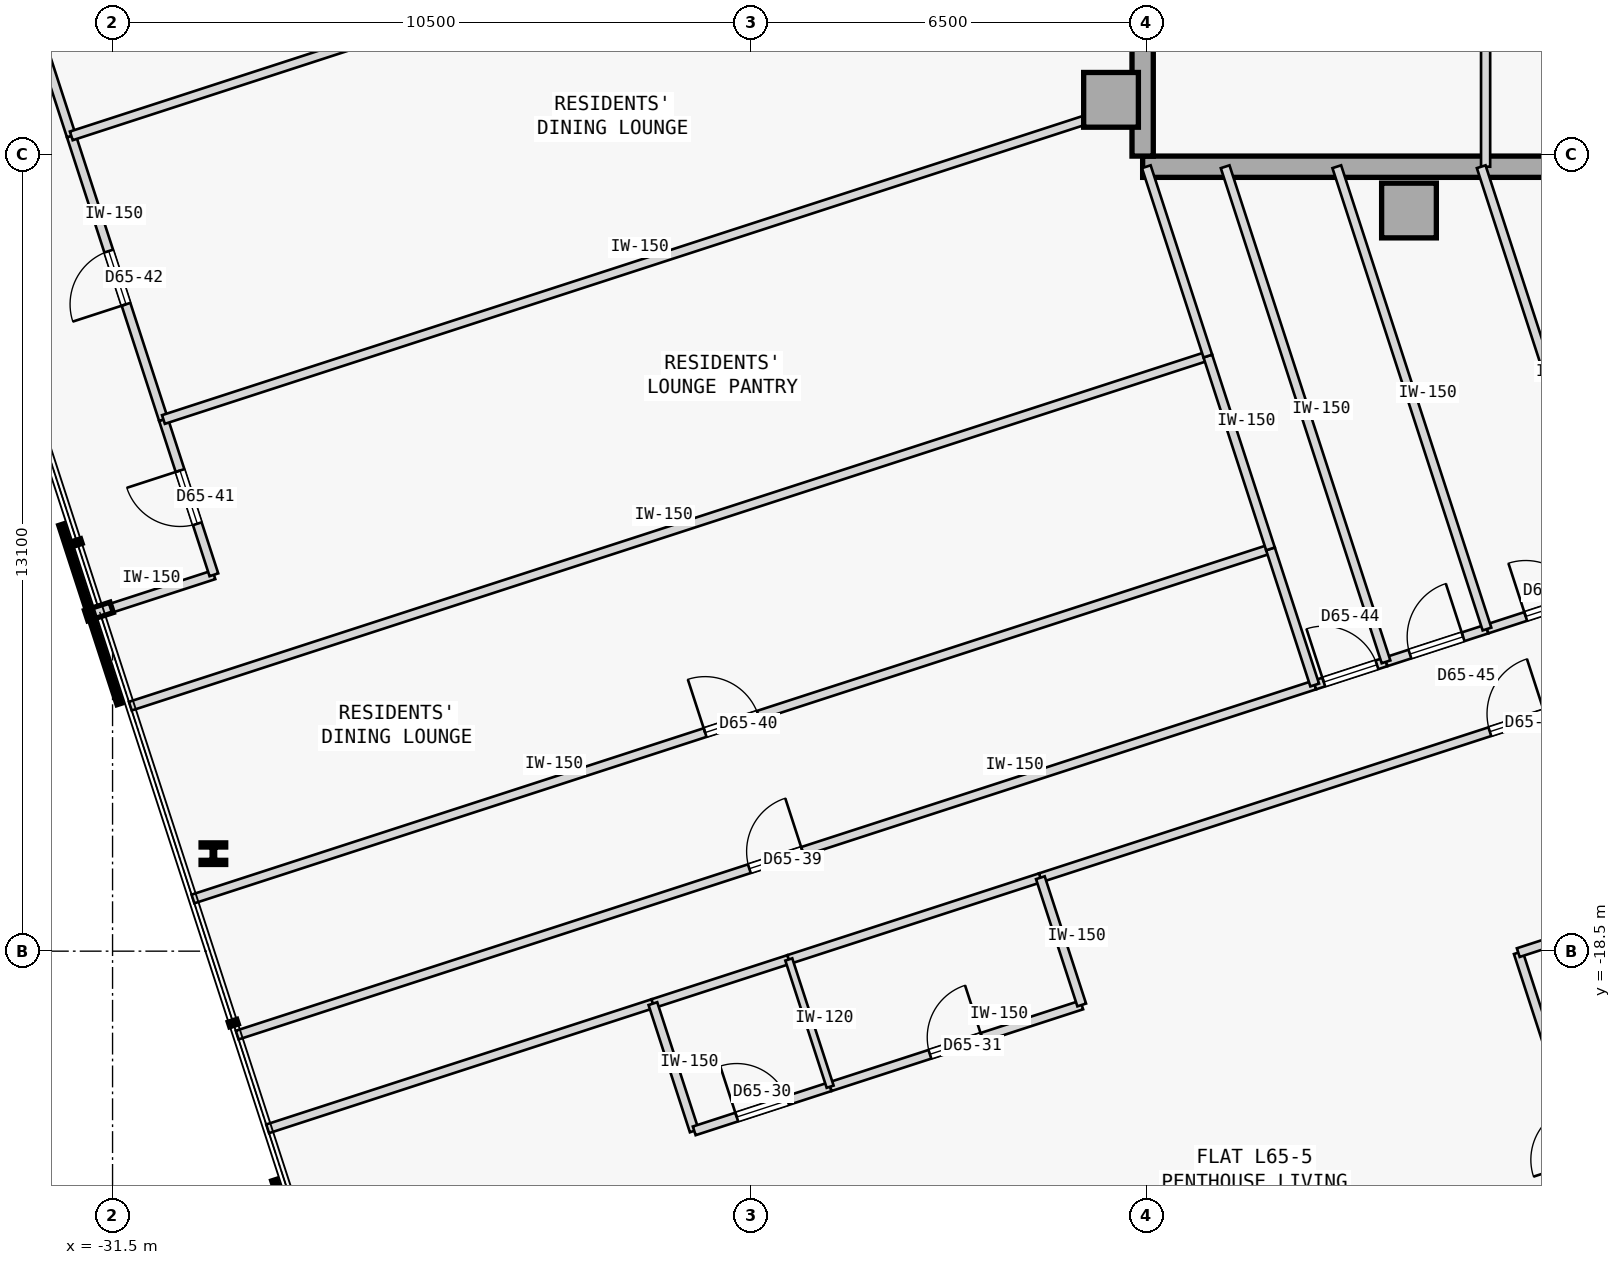
"""IFC4 building model, lengths in metres.
Left out: names, types, materials, properties, quantities, classifications, styles, units other than length and angle.
Written with IfcOpenShell. Run it as: python <this file> out.ifc"""

import sys

from ifc_helpers import new_model, si_unit, direction, frame, frame_2d, origin, origin_2d, place, context, subcontext, project, spatial, rectangle, i_section, extrude, element, fill, save


model = new_model("IFC4")
c1 = context("Model", 3, precision=1e-05, world=origin(), true_north=direction((0.0, 1.0)))
c2 = subcontext(c1, "Body", "Model", "MODEL_VIEW")
j1 = project(units=[si_unit("LENGTHUNIT", "METRE"), si_unit("PLANEANGLEUNIT", "RADIAN")], contexts=[c1])
p1 = place(None, origin())
s1 = spatial("IfcSite", under=j1, at=p1, CompositionType="ELEMENT")
p2 = place(p1, origin())
s2 = spatial("IfcBuilding", under=s1, at=p2, CompositionType="ELEMENT")
p3 = place(p2, frame((0.0, 0.0, 244.4)))
s3 = spatial("IfcBuildingStorey", under=s2, at=p3, CompositionType="ELEMENT", Elevation=244.4)
for number, where, z_axis, x_axis in (
    (1, (-15.08, -4.5, 0.0), (0.0, 0.0, 1.0), (1.0, 0.0, 0.0)),
    (2, (-10.18, -6.32, 0.0), (0.0, 0.0, 1.0), (1.0, 0.0, 0.0)),
):
    element("IfcColumn", number, at=place(p3, frame(where, z_axis=z_axis, x_axis=x_axis)), inside=s3, PredefinedType="COLUMN", context=c2, shape_type="SweptSolid", body=[
        extrude(rectangle(XDim=0.9, YDim=0.9, at=origin_2d()), origin(), (0.0, 0.0, 1.0), 3.35),
    ])
p4 = place(p3, frame((-14.56, -5.6, 0.0), z_axis=(0.0, 0.0, 1.0), x_axis=(1.0, 0.0, 0.0)))
e3 = element("IfcWall", 3, at=p4, inside=s3, PredefinedType="SHEAR", context=c2, shape_type="SweptSolid", body=[
    extrude(rectangle(XDim=10.86, YDim=0.35, at=frame_2d((5.43, 0.0))), origin(), (0.0, 0.0, 1.0), 3.125),
])
p5 = place(p3, frame((-14.56, -5.425, 0.0), z_axis=(0.0, 0.0, 1.0), x_axis=(0.0, 1.0, 0.0)))
e4 = element("IfcWall", 4, at=p5, inside=s3, PredefinedType="SHEAR", context=c2, shape_type="SweptSolid", body=[
    extrude(rectangle(XDim=10.85, YDim=0.35, at=frame_2d((5.425, 0.0))), origin(), (0.0, 0.0, 1.0), 3.125),
])
p6 = place(p3, frame((-29.842, -16.897, 0.0), z_axis=(0.0, 0.0, 1.0), x_axis=(1.0, 0.0, 0.0)))
e5 = element("IfcColumn", 5, at=p6, inside=s3, PredefinedType="COLUMN", context=c2, shape_type="SweptSolid", body=[
    extrude(i_section(OverallWidth=0.405, OverallDepth=0.355, WebThickness=0.042, FlangeThickness=0.068, FilletRadius=0.015, at=origin_2d()), origin(), (0.0, 0.0, 1.0), 3.35),
])
p7 = place(p3, frame((-8.92, -5.6, 0.0), z_axis=(0.0, 0.0, 1.0), x_axis=(0.0, 1.0, 0.0)))
e6 = element("IfcWall", 6, at=p7, inside=s3, PredefinedType="PARTITIONING", context=c2, shape_type="SweptSolid", body=[
    extrude(rectangle(XDim=2.65, YDim=0.15, at=frame_2d((1.325, 0.0))), origin(), (0.0, 0.0, 1.0), 3.125),
])
p8 = place(p3, frame((-28.95, -21.421, 0.0), z_axis=(0.0, 0.0, 1.0), x_axis=(0.951059919169, 0.30900652121, 0.0)))
e7 = element("IfcWall", 7, at=p8, inside=s3, PredefinedType="PARTITIONING", context=c2, shape_type="SweptSolid", body=[
    extrude(rectangle(XDim=6.662, YDim=0.15, at=frame_2d((3.331, 0.0))), origin(), (0.0, 0.0, 1.0), 3.125),
])
p9 = place(p3, frame((-16.242, -17.292, 0.0), z_axis=(0.0, 0.0, 1.0), x_axis=(0.951056800106, 0.309016120894, 0.0)))
e8 = element("IfcWall", 8, at=p9, inside=s3, PredefinedType="PARTITIONING", context=c2, shape_type="SweptSolid", body=[
    extrude(rectangle(XDim=16.494, YDim=0.15, at=frame_2d((8.247, 0.0))), origin(), (0.0, 0.0, 1.0), 3.125),
])
p10 = place(p9, frame((7.772, 0.0, 0.0)))
e9 = element("IfcOpeningElement", 9, at=p10, cuts=e8, PredefinedType="OPENING", context=c2, shape_type="SweptSolid", body=[
    extrude(rectangle(XDim=0.95, YDim=2.15, at=frame_2d((0.475, 1.075))), frame((0.0, 0.085, 0.0), z_axis=(0.0, -1.0, 0.0), x_axis=(1.0, 0.0, 0.0)), (0.0, 0.0, 1.0), 0.17),
])
p11 = place(p3, frame((-22.614, -19.363, 0.0), z_axis=(0.0, 0.0, 1.0), x_axis=(0.951045519245, 0.309050837767, 0.0)))
e10 = element("IfcWall", 10, at=p11, inside=s3, PredefinedType="PARTITIONING", context=c2, shape_type="SweptSolid", body=[
    extrude(rectangle(XDim=2.35, YDim=0.15, at=frame_2d((1.175, 0.0))), origin(), (0.0, 0.0, 1.0), 3.125),
])
p12 = place(p3, frame((-20.379, -18.636, 0.0), z_axis=(0.0, 0.0, 1.0), x_axis=(0.951052627573, 0.309028962374, 0.0)))
e11 = element("IfcWall", 11, at=p12, inside=s3, PredefinedType="PARTITIONING", context=c2, shape_type="SweptSolid", body=[
    extrude(rectangle(XDim=4.35, YDim=0.15, at=frame_2d((2.175, 0.0))), origin(), (0.0, 0.0, 1.0), 3.125),
])
p13 = place(p3, frame((-29.45, -19.881, 0.0), z_axis=(0.0, 0.0, 1.0), x_axis=(0.95105650271, 0.309017036186, 0.0)))
e12 = element("IfcWall", 12, at=p13, inside=s3, PredefinedType="PARTITIONING", context=c2, shape_type="SweptSolid", body=[
    extrude(rectangle(XDim=18.632, YDim=0.15, at=frame_2d((9.316, 0.0))), origin(), (0.0, 0.0, 1.0), 3.125),
])
p14 = place(p13, frame((8.856, 0.0, 0.0)))
e13 = element("IfcOpeningElement", 13, at=p14, cuts=e12, PredefinedType="OPENING", context=c2, shape_type="SweptSolid", body=[
    extrude(rectangle(XDim=0.92, YDim=2.15, at=frame_2d((0.46, 1.075))), frame((0.0, 0.085, 0.0), z_axis=(0.0, -1.0, 0.0), x_axis=(1.0, 0.0, 0.0)), (0.0, 0.0, 1.0), 0.17),
])
p15 = place(p3, frame((-31.712, -12.921, 0.0), z_axis=(0.0, 0.0, 1.0), x_axis=(0.951054051148, 0.309024581215, 0.0)))
e14 = element("IfcWall", 14, at=p15, inside=s3, PredefinedType="PARTITIONING", context=c2, shape_type="SweptSolid", body=[
    extrude(rectangle(XDim=1.975, YDim=0.15, at=frame_2d((0.988, 0.0))), origin(), (0.0, 0.0, 1.0), 3.125),
])
p16 = place(p3, frame((-29.833, -12.311, 0.0), z_axis=(0.0, 0.0, 1.0), x_axis=(-0.309044953986, 0.951047431213, 0.0)))
e15 = element("IfcWall", 15, at=p16, inside=s3, PredefinedType="PARTITIONING", context=c2, shape_type="SweptSolid", body=[
    extrude(rectangle(XDim=2.685, YDim=0.15, at=frame_2d((1.343, 0.0))), origin(), (0.0, 0.0, 1.0), 3.125),
])
p17 = place(p16, frame((0.883, 0.0, 0.0)))
e16 = element("IfcOpeningElement", 16, at=p17, cuts=e15, PredefinedType="OPENING", context=c2, shape_type="SweptSolid", body=[
    extrude(rectangle(XDim=0.92, YDim=2.15, at=frame_2d((0.46, 1.075))), frame((0.0, 0.085, 0.0), z_axis=(0.0, -1.0, 0.0), x_axis=(1.0, 0.0, 0.0)), (0.0, 0.0, 1.0), 0.17),
])
p18 = place(p3, frame((-30.663, -9.757, 0.0), z_axis=(0.0, 0.0, 1.0), x_axis=(-0.309019653166, 0.951055652397, 0.0)))
e17 = element("IfcWall", 17, at=p18, inside=s3, PredefinedType="PARTITIONING", context=c2, shape_type="SweptSolid", body=[
    extrude(rectangle(XDim=4.904, YDim=0.15, at=frame_2d((2.452, 0.0))), origin(), (0.0, 0.0, 1.0), 3.125),
])
p19 = place(p18, frame((1.992, 0.0, 0.0)))
e18 = element("IfcOpeningElement", 18, at=p19, cuts=e17, PredefinedType="OPENING", context=c2, shape_type="SweptSolid", body=[
    extrude(rectangle(XDim=0.92, YDim=2.15, at=frame_2d((0.46, 1.075))), frame((0.0, 0.085, 0.0), z_axis=(0.0, -1.0, 0.0), x_axis=(1.0, 0.0, 0.0)), (0.0, 0.0, 1.0), 0.17),
])
p20 = place(p3, frame((-32.179, -5.093, 0.0), z_axis=(0.0, 0.0, 1.0), x_axis=(-0.309014532869, 0.951057316083, 0.0)))
e19 = element("IfcWall", 19, at=p20, inside=s3, PredefinedType="PARTITIONING", context=c2, shape_type="SweptSolid", body=[
    extrude(rectangle(XDim=4.707, YDim=0.15, at=frame_2d((2.354, 0.0))), origin(), (0.0, 0.0, 1.0), 3.125),
])
p21 = place(p3, frame((-11.73, -14.123, 0.0), z_axis=(0.0, 0.0, 1.0), x_axis=(0.951032613602, 0.309090549622, 0.0)))
e20 = element("IfcWall", 20, at=p21, inside=s3, PredefinedType="PARTITIONING", context=c2, shape_type="SweptSolid", body=[
    extrude(rectangle(XDim=1.233, YDim=0.15, at=frame_2d((0.616, 0.0))), origin(), (0.0, 0.0, 1.0), 3.125),
])
p22 = place(p21, frame((0.156, 0.0, 0.0)))
e21 = element("IfcOpeningElement", 21, at=p22, cuts=e20, PredefinedType="OPENING", context=c2, shape_type="SweptSolid", body=[
    extrude(rectangle(XDim=0.92, YDim=2.15, at=frame_2d((0.46, 1.075))), frame((0.0, 0.085, 0.0), z_axis=(0.0, -1.0, 0.0), x_axis=(1.0, 0.0, 0.0)), (0.0, 0.0, 1.0), 0.17),
])
p23 = place(p3, frame((-10.558, -13.742, 0.0), z_axis=(0.0, 0.0, 1.0), x_axis=(0.951060780507, 0.309003870173, 0.0)))
e22 = element("IfcWall", 22, at=p23, inside=s3, PredefinedType="PARTITIONING", context=c2, shape_type="SweptSolid", body=[
    extrude(rectangle(XDim=1.746, YDim=0.15, at=frame_2d((0.873, 0.0))), origin(), (0.0, 0.0, 1.0), 3.125),
])
p24 = place(p23, frame((0.413, 0.0, 0.0)))
e23 = element("IfcOpeningElement", 23, at=p24, cuts=e22, PredefinedType="OPENING", context=c2, shape_type="SweptSolid", body=[
    extrude(rectangle(XDim=0.92, YDim=2.15, at=frame_2d((0.46, 1.075))), frame((0.0, 0.085, 0.0), z_axis=(0.0, -1.0, 0.0), x_axis=(1.0, 0.0, 0.0)), (0.0, 0.0, 1.0), 0.17),
])
p25 = place(p3, frame((-8.897, -13.202, 0.0), z_axis=(0.0, 0.0, 1.0), x_axis=(0.951065832698, 0.308988319964, 0.0)))
e24 = element("IfcWall", 24, at=p25, inside=s3, PredefinedType="PARTITIONING", context=c2, shape_type="SweptSolid", body=[
    extrude(rectangle(XDim=2.259, YDim=0.15, at=frame_2d((1.129, 0.0))), origin(), (0.0, 0.0, 1.0), 3.125),
])
p26 = place(p25, frame((0.669, 0.0, 0.0)))
e25 = element("IfcOpeningElement", 25, at=p26, cuts=e24, PredefinedType="OPENING", context=c2, shape_type="SweptSolid", body=[
    extrude(rectangle(XDim=0.92, YDim=2.15, at=frame_2d((0.46, 1.075))), frame((0.0, 0.085, 0.0), z_axis=(0.0, -1.0, 0.0), x_axis=(1.0, 0.0, 0.0)), (0.0, 0.0, 1.0), 0.17),
])
p27 = place(p3, frame((-21.934, -21.455, 0.0), z_axis=(0.0, 0.0, 1.0), x_axis=(-0.309060979314, 0.951042223598, 0.0)))
e26 = element("IfcWall", 26, at=p27, inside=s3, PredefinedType="PARTITIONING", context=c2, shape_type="SweptSolid", body=[
    extrude(rectangle(XDim=2.2, YDim=0.15, at=frame_2d((1.1, 0.0))), origin(), (0.0, 0.0, 1.0), 3.125),
])
p28 = place(p3, frame((-21.934, -21.455, 0.0), z_axis=(0.0, 0.0, 1.0), x_axis=(0.951035595692, 0.309081373955, 0.0)))
e27 = element("IfcWall", 27, at=p28, inside=s3, PredefinedType="PARTITIONING", context=c2, shape_type="SweptSolid", body=[
    extrude(rectangle(XDim=2.35, YDim=0.15, at=frame_2d((1.175, 0.0))), origin(), (0.0, 0.0, 1.0), 3.125),
])
p29 = place(p28, frame((0.735, 0.0, 0.0)))
e28 = element("IfcOpeningElement", 28, at=p29, cuts=e27, PredefinedType="OPENING", context=c2, shape_type="SweptSolid", body=[
    extrude(rectangle(XDim=0.88, YDim=2.15, at=frame_2d((0.44, 1.075))), frame((0.0, 0.085, 0.0), z_axis=(0.0, -1.0, 0.0), x_axis=(1.0, 0.0, 0.0)), (0.0, 0.0, 1.0), 0.17),
])
p30 = place(p3, frame((-19.699, -20.729, 0.0), z_axis=(0.0, 0.0, 1.0), x_axis=(0.951057987102, 0.309012467661, 0.0)))
e29 = element("IfcWall", 29, at=p30, inside=s3, PredefinedType="PARTITIONING", context=c2, shape_type="SweptSolid", body=[
    extrude(rectangle(XDim=4.35, YDim=0.15, at=frame_2d((2.175, 0.0))), origin(), (0.0, 0.0, 1.0), 3.125),
])
p31 = place(p30, frame((1.725, 0.0, 0.0)))
e30 = element("IfcOpeningElement", 30, at=p31, cuts=e29, PredefinedType="OPENING", context=c2, shape_type="SweptSolid", body=[
    extrude(rectangle(XDim=0.9, YDim=2.15, at=frame_2d((0.45, 1.075))), frame((0.0, 0.085, 0.0), z_axis=(0.0, -1.0, 0.0), x_axis=(1.0, 0.0, 0.0)), (0.0, 0.0, 1.0), 0.17),
])
p32 = place(p3, frame((-15.562, -19.385, 0.0), z_axis=(0.0, 0.0, 1.0), x_axis=(-0.309060979314, 0.951042223598, 0.0)))
e31 = element("IfcWall", 31, at=p32, inside=s3, PredefinedType="PARTITIONING", context=c2, shape_type="SweptSolid", body=[
    extrude(rectangle(XDim=2.2, YDim=0.15, at=frame_2d((1.1, 0.0))), origin(), (0.0, 0.0, 1.0), 3.125),
])
p33 = place(p3, frame((-6.448, -24.479, 0.0), z_axis=(0.0, 0.0, 1.0), x_axis=(-0.309049046683, 0.951046101272, 0.0)))
e32 = element("IfcWall", 32, at=p33, inside=s3, PredefinedType="PARTITIONING", context=c2, shape_type="SweptSolid", body=[
    extrude(rectangle(XDim=6.262, YDim=0.15, at=frame_2d((3.131, 0.0))), origin(), (0.0, 0.0, 1.0), 3.125),
])
p34 = place(p33, frame((2.681, 0.0, 0.0)))
e33 = element("IfcOpeningElement", 33, at=p34, cuts=e32, PredefinedType="OPENING", context=c2, shape_type="SweptSolid", body=[
    extrude(rectangle(XDim=0.9, YDim=2.15, at=frame_2d((0.45, 1.075))), frame((0.0, 0.085, 0.0), z_axis=(0.0, -1.0, 0.0), x_axis=(1.0, 0.0, 0.0)), (0.0, 0.0, 1.0), 0.17),
])
p35 = place(p3, frame((-8.383, -18.524, 0.0), z_axis=(0.0, 0.0, 1.0), x_axis=(0.951055286502, 0.309020779263, 0.0)))
e34 = element("IfcWall", 34, at=p35, inside=s3, PredefinedType="PARTITIONING", context=c2, shape_type="SweptSolid", body=[
    extrude(rectangle(XDim=4.65, YDim=0.15, at=frame_2d((2.325, 0.0))), origin(), (0.0, 0.0, 1.0), 3.125),
])
p36 = place(p3, frame((-19.699, -20.729, 0.0), z_axis=(0.0, 0.0, 1.0), x_axis=(-0.308960600764, 0.951074837842, 0.0)))
e35 = element("IfcWall", 35, at=p36, inside=s3, PredefinedType="PARTITIONING", context=c2, shape_type="SweptSolid", body=[
    extrude(rectangle(XDim=2.2, YDim=0.12, at=frame_2d((1.1, 0.0))), origin(), (0.0, 0.0, 1.0), 3.125),
])
p37 = place(p3, frame((-30.178, -17.642, 0.0), z_axis=(0.0, 0.0, 1.0), x_axis=(0.95105650271, 0.309017036186, 0.0)))
e36 = element("IfcWall", 36, at=p37, inside=s3, PredefinedType="PARTITIONING", context=c2, shape_type="SweptSolid", body=[
    extrude(rectangle(XDim=18.632, YDim=0.15, at=frame_2d((9.316, 0.0))), origin(), (0.0, 0.0, 1.0), 3.125),
])
p38 = place(p37, frame((8.856, 0.0, 0.0)))
e37 = element("IfcOpeningElement", 37, at=p38, cuts=e36, PredefinedType="OPENING", context=c2, shape_type="SweptSolid", body=[
    extrude(rectangle(XDim=0.92, YDim=2.15, at=frame_2d((0.46, 1.075))), frame((0.0, 0.085, 0.0), z_axis=(0.0, -1.0, 0.0), x_axis=(1.0, 0.0, 0.0)), (0.0, 0.0, 1.0), 0.17),
])
p39 = place(p3, frame((-11.73, -14.123, 0.0), z_axis=(0.0, 0.0, 1.0), x_axis=(-0.309062621189, 0.951041690035, 0.0)))
e38 = element("IfcWall", 38, at=p39, inside=s3, PredefinedType="PARTITIONING", context=c2, shape_type="SweptSolid", body=[
    extrude(rectangle(XDim=2.354, YDim=0.15, at=frame_2d((1.177, 0.0))), origin(), (0.0, 0.0, 1.0), 3.125),
])
p40 = place(p3, frame((-31.208, -14.471, 0.0), z_axis=(0.0, 0.0, 1.0), x_axis=(0.951057753948, 0.309013185244, 0.0)))
e39 = element("IfcWall", 39, at=p40, inside=s3, PredefinedType="PARTITIONING", context=c2, shape_type="SweptSolid", body=[
    extrude(rectangle(XDim=18.632, YDim=0.15, at=frame_2d((9.316, 0.0))), origin(), (0.0, 0.0, 1.0), 3.125),
])
p41 = place(p3, frame((-12.458, -11.884, 0.0), z_axis=(0.0, 0.0, 1.0), x_axis=(-0.308946982245, 0.951079261766, 0.0)))
e40 = element("IfcWall", 40, at=p41, inside=s3, PredefinedType="PARTITIONING", context=c2, shape_type="SweptSolid", body=[
    extrude(rectangle(XDim=3.334, YDim=0.15, at=frame_2d((1.667, 0.0))), origin(), (0.0, 0.0, 1.0), 3.125),
])
p42 = place(p3, frame((-30.663, -9.757, 0.0), z_axis=(0.0, 0.0, 1.0), x_axis=(0.951058192995, 0.309011833974, 0.0)))
e41 = element("IfcWall", 41, at=p42, inside=s3, PredefinedType="PARTITIONING", context=c2, shape_type="SweptSolid", body=[
    extrude(rectangle(XDim=16.657, YDim=0.15, at=frame_2d((8.329, 0.0))), origin(), (0.0, 0.0, 1.0), 3.125),
])
p43 = place(p3, frame((-13.488, -8.713, 0.0), z_axis=(0.0, 0.0, 1.0), x_axis=(-0.309082700143, 0.951035164687, 0.0)))
e42 = element("IfcWall", 42, at=p43, inside=s3, PredefinedType="PARTITIONING", context=c2, shape_type="SweptSolid", body=[
    extrude(rectangle(XDim=3.274, YDim=0.15, at=frame_2d((1.637, 0.0))), origin(), (0.0, 0.0, 1.0), 3.125),
])
p44 = place(p3, frame((-32.179, -5.093, 0.0), z_axis=(0.0, 0.0, 1.0), x_axis=(0.951053885426, 0.309025091239, 0.0)))
e43 = element("IfcWall", 43, at=p44, inside=s3, PredefinedType="PARTITIONING", context=c2, shape_type="SweptSolid", body=[
    extrude(rectangle(XDim=16.657, YDim=0.15, at=frame_2d((8.329, 0.0))), origin(), (0.0, 0.0, 1.0), 3.125),
])
p45 = place(p3, frame((-10.558, -13.742, 0.0), z_axis=(0.0, 0.0, 1.0), x_axis=(-0.309023521796, 0.951054395383, 0.0)))
e44 = element("IfcWall", 44, at=p45, inside=s3, PredefinedType="PARTITIONING", context=c2, shape_type="SweptSolid", body=[
    extrude(rectangle(XDim=8.561, YDim=0.15, at=frame_2d((4.28, 0.0))), origin(), (0.0, 0.0, 1.0), 3.125),
])
p46 = place(p3, frame((-8.897, -13.202, 0.0), z_axis=(0.0, 0.0, 1.0), x_axis=(-0.309008036968, 0.951059426687, 0.0)))
e45 = element("IfcWall", 45, at=p46, inside=s3, PredefinedType="PARTITIONING", context=c2, shape_type="SweptSolid", body=[
    extrude(rectangle(XDim=7.994, YDim=0.15, at=frame_2d((3.997, 0.0))), origin(), (0.0, 0.0, 1.0), 3.125),
])
p47 = place(p3, frame((-6.749, -12.504, 0.0), z_axis=(0.0, 0.0, 1.0), x_axis=(-0.309005471061, 0.95106026037, 0.0)))
e46 = element("IfcWall", 46, at=p47, inside=s3, PredefinedType="PARTITIONING", context=c2, shape_type="SweptSolid", body=[
    extrude(rectangle(XDim=7.26, YDim=0.15, at=frame_2d((3.63, 0.0))), origin(), (0.0, 0.0, 1.0), 3.125),
])
p48 = place(p10, origin())
e47 = element("IfcDoor", 47, at=p48, inside=s3, OperationType="SINGLE_SWING_RIGHT", PredefinedType="DOOR", context=c2, shape_type="SweptSolid", body=[
    extrude(rectangle(XDim=0.95, YDim=2.15, at=frame_2d((0.475, 1.075))), frame((0.0, 0.025, 0.0), z_axis=(0.0, -1.0, 0.0), x_axis=(1.0, 0.0, 0.0)), (0.0, 0.0, 1.0), 0.05),
])
fill(e9, e47)
p49 = place(p29, origin())
e48 = element("IfcDoor", 48, at=p49, inside=s3, OperationType="SINGLE_SWING_LEFT", PredefinedType="DOOR", context=c2, shape_type="SweptSolid", body=[
    extrude(rectangle(XDim=0.88, YDim=2.15, at=frame_2d((0.44, 1.075))), frame((0.0, 0.025, 0.0), z_axis=(0.0, -1.0, 0.0), x_axis=(1.0, 0.0, 0.0)), (0.0, 0.0, 1.0), 0.05),
])
fill(e28, e48)
p50 = place(p31, origin())
e49 = element("IfcDoor", 49, at=p50, inside=s3, OperationType="SINGLE_SWING_RIGHT", PredefinedType="DOOR", context=c2, shape_type="SweptSolid", body=[
    extrude(rectangle(XDim=0.9, YDim=2.15, at=frame_2d((0.45, 1.075))), frame((0.0, 0.025, 0.0), z_axis=(0.0, -1.0, 0.0), x_axis=(1.0, 0.0, 0.0)), (0.0, 0.0, 1.0), 0.05),
])
fill(e30, e49)
p51 = place(p14, origin())
e50 = element("IfcDoor", 50, at=p51, inside=s3, OperationType="SINGLE_SWING_RIGHT", PredefinedType="DOOR", context=c2, shape_type="SweptSolid", body=[
    extrude(rectangle(XDim=0.92, YDim=2.15, at=frame_2d((0.46, 1.075))), frame((0.0, 0.025, 0.0), z_axis=(0.0, -1.0, 0.0), x_axis=(1.0, 0.0, 0.0)), (0.0, 0.0, 1.0), 0.05),
])
fill(e13, e50)
p52 = place(p38, origin())
e51 = element("IfcDoor", 51, at=p52, inside=s3, OperationType="SINGLE_SWING_LEFT", PredefinedType="DOOR", context=c2, shape_type="SweptSolid", body=[
    extrude(rectangle(XDim=0.92, YDim=2.15, at=frame_2d((0.46, 1.075))), frame((0.0, 0.025, 0.0), z_axis=(0.0, -1.0, 0.0), x_axis=(1.0, 0.0, 0.0)), (0.0, 0.0, 1.0), 0.05),
])
fill(e37, e51)
p53 = place(p17, origin())
e52 = element("IfcDoor", 52, at=p53, inside=s3, OperationType="SINGLE_SWING_RIGHT", PredefinedType="DOOR", context=c2, shape_type="SweptSolid", body=[
    extrude(rectangle(XDim=0.92, YDim=2.15, at=frame_2d((0.46, 1.075))), frame((0.0, 0.025, 0.0), z_axis=(0.0, -1.0, 0.0), x_axis=(1.0, 0.0, 0.0)), (0.0, 0.0, 1.0), 0.05),
])
fill(e16, e52)
p54 = place(p19, origin())
e53 = element("IfcDoor", 53, at=p54, inside=s3, OperationType="SINGLE_SWING_LEFT", PredefinedType="DOOR", context=c2, shape_type="SweptSolid", body=[
    extrude(rectangle(XDim=0.92, YDim=2.15, at=frame_2d((0.46, 1.075))), frame((0.0, 0.025, 0.0), z_axis=(0.0, -1.0, 0.0), x_axis=(1.0, 0.0, 0.0)), (0.0, 0.0, 1.0), 0.05),
])
fill(e18, e53)
p55 = place(p22, origin())
e54 = element("IfcDoor", 54, at=p55, inside=s3, OperationType="SINGLE_SWING_LEFT", PredefinedType="DOOR", context=c2, shape_type="SweptSolid", body=[
    extrude(rectangle(XDim=0.92, YDim=2.15, at=frame_2d((0.46, 1.075))), frame((0.0, 0.025, 0.0), z_axis=(0.0, -1.0, 0.0), x_axis=(1.0, 0.0, 0.0)), (0.0, 0.0, 1.0), 0.05),
])
fill(e21, e54)
p56 = place(p24, origin())
e55 = element("IfcDoor", 55, at=p56, inside=s3, OperationType="SINGLE_SWING_RIGHT", PredefinedType="DOOR", context=c2, shape_type="SweptSolid", body=[
    extrude(rectangle(XDim=0.92, YDim=2.15, at=frame_2d((0.46, 1.075))), frame((0.0, 0.025, 0.0), z_axis=(0.0, -1.0, 0.0), x_axis=(1.0, 0.0, 0.0)), (0.0, 0.0, 1.0), 0.05),
])
fill(e23, e55)
p57 = place(p26, origin())
e56 = element("IfcDoor", 56, at=p57, inside=s3, OperationType="SINGLE_SWING_LEFT", PredefinedType="DOOR", context=c2, shape_type="SweptSolid", body=[
    extrude(rectangle(XDim=0.92, YDim=2.15, at=frame_2d((0.46, 1.075))), frame((0.0, 0.025, 0.0), z_axis=(0.0, -1.0, 0.0), x_axis=(1.0, 0.0, 0.0)), (0.0, 0.0, 1.0), 0.05),
])
fill(e25, e56)
save(model, sys.argv[1])
